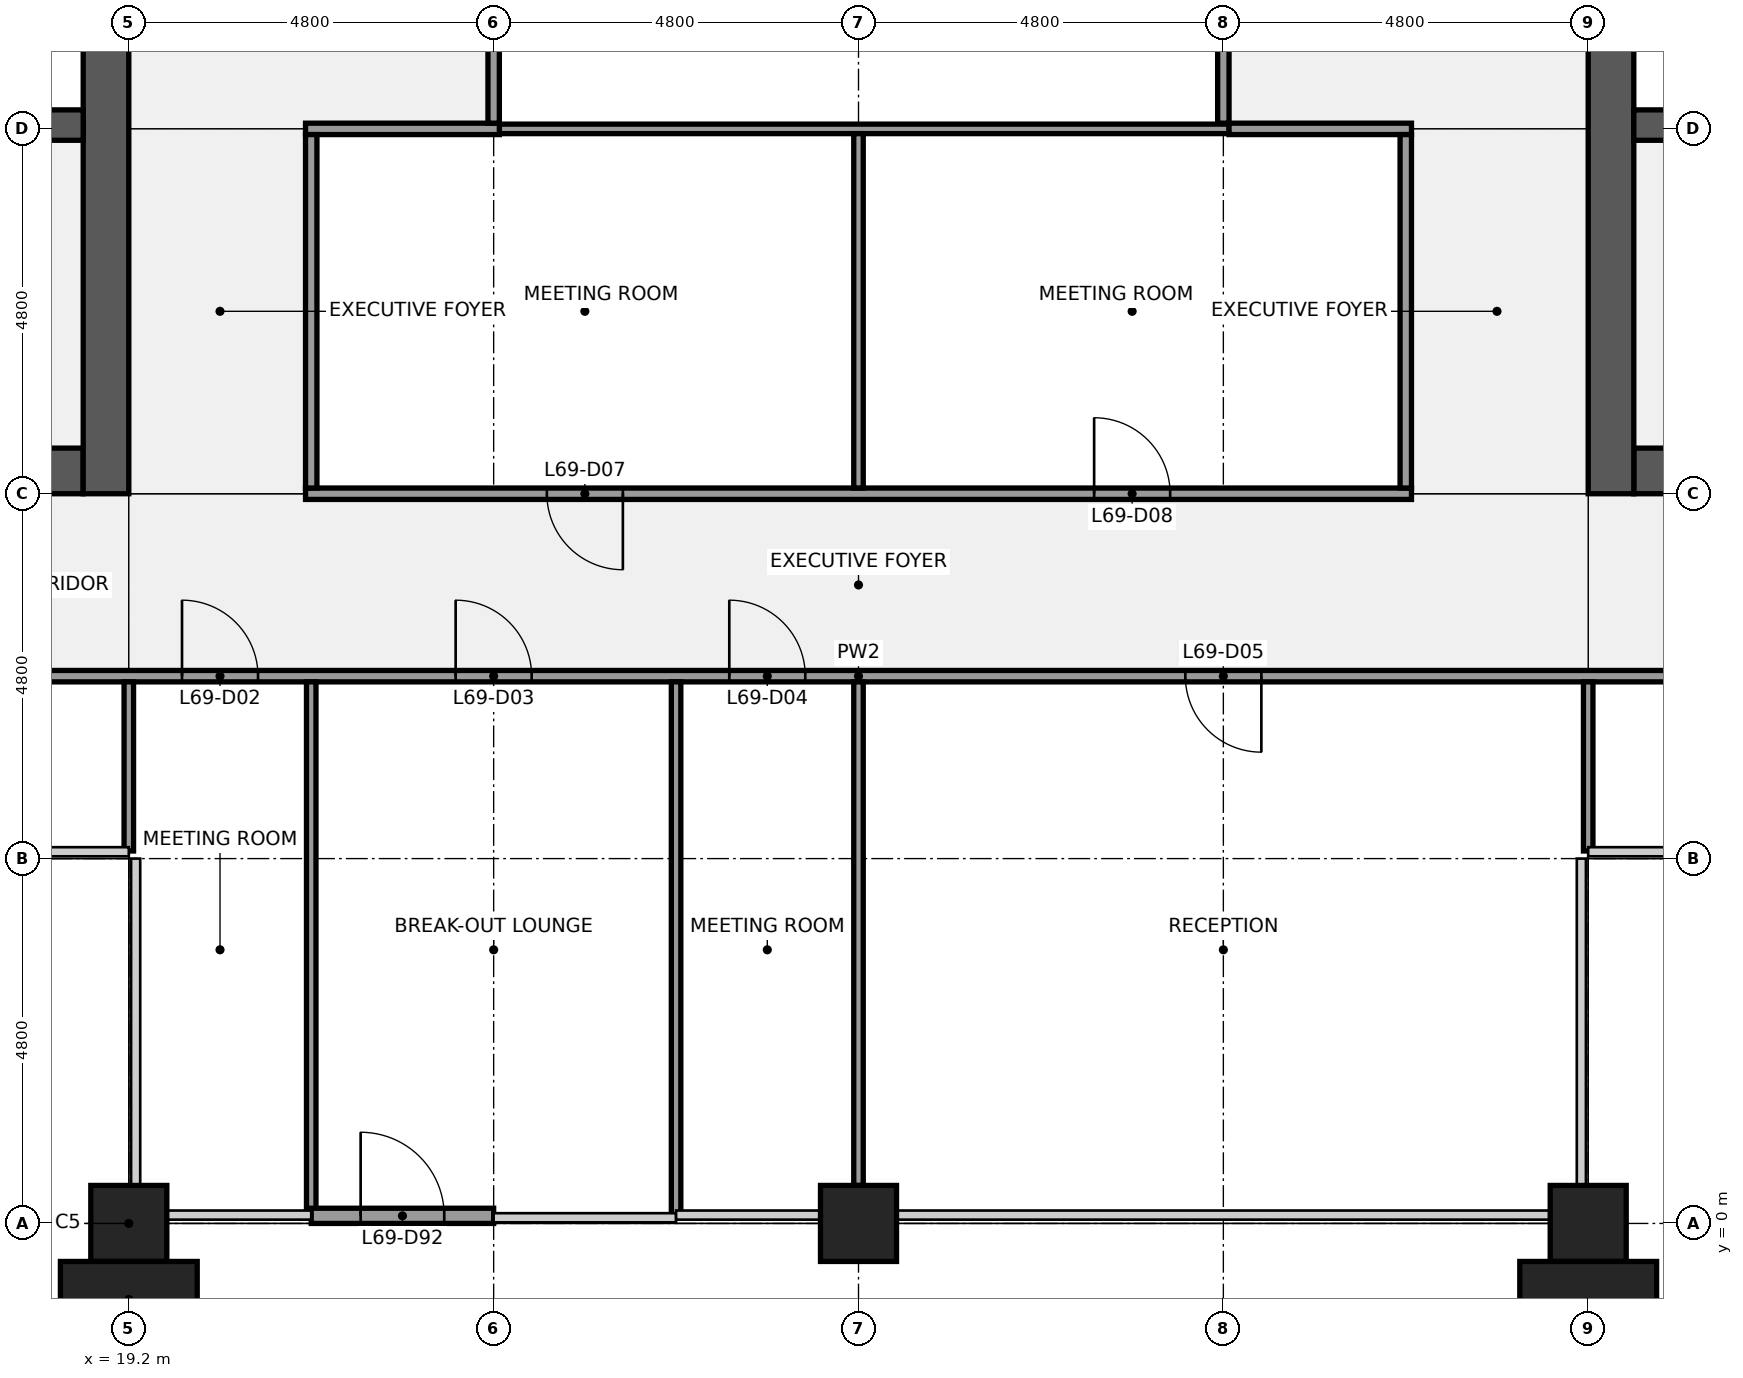
"""IFC4 building model, lengths in metres.
Left out: names, types, materials, properties, quantities, classifications, styles, units other than length and angle.
Written with IfcOpenShell. Run it as: python <this file> out.ifc"""

import sys

from ifc_helpers import new_model, si_unit, direction, frame, frame_2d, origin, origin_2d, place, context, subcontext, project, spatial, rectangle, extrude, element, fill, save


model = new_model("IFC4")
c1 = context("Model", 3, precision=1e-05, world=origin(), true_north=direction((0.0, 1.0)))
c2 = subcontext(c1, "Body", "Model", "MODEL_VIEW")
j1 = project(units=[si_unit("LENGTHUNIT", "METRE"), si_unit("PLANEANGLEUNIT", "RADIAN")], contexts=[c1])
p1 = place(None, origin())
s1 = spatial("IfcSite", under=j1, at=p1, CompositionType="ELEMENT")
p2 = place(p1, origin())
s2 = spatial("IfcBuilding", under=s1, at=p2, CompositionType="ELEMENT")
p3 = place(p2, frame((0.0, 0.0, 314.3)))
s3 = spatial("IfcBuildingStorey", under=s2, at=p3, CompositionType="ELEMENT", Elevation=314.3)
for number, where, z_axis, x_axis in (
    (1, (19.2, 0.0, 0.0), (0.0, 0.0, 1.0), (1.0, 0.0, 0.0)),
    (2, (28.8, 0.0, 0.0), (0.0, 0.0, 1.0), (1.0, 0.0, 0.0)),
    (3, (38.4, 0.0, 0.0), (0.0, 0.0, 1.0), (1.0, 0.0, 0.0)),
):
    element("IfcColumn", number, at=place(p3, frame(where, z_axis=z_axis, x_axis=x_axis)), inside=s3, PredefinedType="COLUMN", context=c2, shape_type="SweptSolid", body=[
        extrude(rectangle(XDim=1.0, YDim=1.0, at=origin_2d()), origin(), (0.0, 0.0, 1.0), 4.0),
    ])
p4 = place(p3, frame((18.6, 9.9, 0.0), z_axis=(0.0, 0.0, 1.0), x_axis=(-1.0, 0.0, 0.0)))
e4 = element("IfcWall", 4, at=p4, inside=s3, PredefinedType="SHEAR", context=c2, shape_type="SweptSolid", body=[
    extrude(rectangle(XDim=4.2, YDim=0.6, at=frame_2d((2.1, 0.0))), origin(), (0.0, 0.0, 1.0), 3.84),
])
p5 = place(p4, frame((1.25, 0.0, 0.0)))
e5 = element("IfcOpeningElement", 5, at=p5, cuts=e4, PredefinedType="OPENING", context=c2, shape_type="SweptSolid", body=[
    extrude(rectangle(XDim=1.1, YDim=2.1, at=frame_2d((0.55, 1.05))), frame((0.0, 0.31, 0.0), z_axis=(0.0, -1.0, 0.0), x_axis=(1.0, 0.0, 0.0)), (0.0, 0.0, 1.0), 0.62),
])
p6 = place(p3, frame((18.9, 38.4, 0.0), z_axis=(0.0, 0.0, 1.0), x_axis=(0.0, -1.0, 0.0)))
e6 = element("IfcWall", 6, at=p6, inside=s3, PredefinedType="SHEAR", context=c2, shape_type="SweptSolid", body=[
    extrude(rectangle(XDim=28.8, YDim=0.6, at=frame_2d((14.4, 0.0))), origin(), (0.0, 0.0, 1.0), 3.84),
])
p7 = place(p6, frame((18.3, 0.0, 0.0)))
e7 = element("IfcOpeningElement", 7, at=p7, cuts=e6, PredefinedType="OPENING", context=c2, shape_type="SweptSolid", body=[
    extrude(rectangle(XDim=1.8, YDim=2.1, at=frame_2d((0.9, 1.05))), frame((0.0, 0.31, 0.0), z_axis=(0.0, -1.0, 0.0), x_axis=(1.0, 0.0, 0.0)), (0.0, 0.0, 1.0), 0.62),
])
p8 = place(p6, frame((8.7, 0.0, 0.0)))
e8 = element("IfcOpeningElement", 8, at=p8, cuts=e6, PredefinedType="OPENING", context=c2, shape_type="SweptSolid", body=[
    extrude(rectangle(XDim=1.8, YDim=2.1, at=frame_2d((0.9, 1.05))), frame((0.0, 0.31, 0.0), z_axis=(0.0, -1.0, 0.0), x_axis=(1.0, 0.0, 0.0)), (0.0, 0.0, 1.0), 0.62),
])
p9 = place(p3, frame((0.6, 14.45, 0.0), z_axis=(0.0, 0.0, 1.0), x_axis=(1.0, 0.0, 0.0)))
e9 = element("IfcWall", 9, at=p9, inside=s3, PredefinedType="SHEAR", context=c2, shape_type="SweptSolid", body=[
    extrude(rectangle(XDim=18.0, YDim=0.4, at=frame_2d((9.0, 0.0))), origin(), (0.0, 0.0, 1.0), 3.84),
])
p10 = place(p3, frame((43.2, 9.9, 0.0), z_axis=(0.0, 0.0, 1.0), x_axis=(-1.0, 0.0, 0.0)))
e10 = element("IfcWall", 10, at=p10, inside=s3, PredefinedType="SHEAR", context=c2, shape_type="SweptSolid", body=[
    extrude(rectangle(XDim=4.2, YDim=0.6, at=frame_2d((2.1, 0.0))), origin(), (0.0, 0.0, 1.0), 3.84),
])
p11 = place(p10, frame((1.85, 0.0, 0.0)))
e11 = element("IfcOpeningElement", 11, at=p11, cuts=e10, PredefinedType="OPENING", context=c2, shape_type="SweptSolid", body=[
    extrude(rectangle(XDim=1.1, YDim=2.1, at=frame_2d((0.55, 1.05))), frame((0.0, 0.31, 0.0), z_axis=(0.0, -1.0, 0.0), x_axis=(1.0, 0.0, 0.0)), (0.0, 0.0, 1.0), 0.62),
])
p12 = place(p3, frame((38.7, 9.6, 0.0), z_axis=(0.0, 0.0, 1.0), x_axis=(0.0, 1.0, 0.0)))
e12 = element("IfcWall", 12, at=p12, inside=s3, PredefinedType="SHEAR", context=c2, shape_type="SweptSolid", body=[
    extrude(rectangle(XDim=28.8, YDim=0.6, at=frame_2d((14.4, 0.0))), origin(), (0.0, 0.0, 1.0), 3.84),
])
p13 = place(p12, frame((8.7, 0.0, 0.0)))
e13 = element("IfcOpeningElement", 13, at=p13, cuts=e12, PredefinedType="OPENING", context=c2, shape_type="SweptSolid", body=[
    extrude(rectangle(XDim=1.8, YDim=2.1, at=frame_2d((0.9, 1.05))), frame((0.0, 0.31, 0.0), z_axis=(0.0, -1.0, 0.0), x_axis=(1.0, 0.0, 0.0)), (0.0, 0.0, 1.0), 0.62),
])
p14 = place(p12, frame((18.3, 0.0, 0.0)))
e14 = element("IfcOpeningElement", 14, at=p14, cuts=e12, PredefinedType="OPENING", context=c2, shape_type="SweptSolid", body=[
    extrude(rectangle(XDim=1.8, YDim=2.1, at=frame_2d((0.9, 1.05))), frame((0.0, 0.31, 0.0), z_axis=(0.0, -1.0, 0.0), x_axis=(1.0, 0.0, 0.0)), (0.0, 0.0, 1.0), 0.62),
])
p15 = place(p3, frame((39.0, 14.45, 0.0), z_axis=(0.0, 0.0, 1.0), x_axis=(1.0, 0.0, 0.0)))
e15 = element("IfcWall", 15, at=p15, inside=s3, PredefinedType="SHEAR", context=c2, shape_type="SweptSolid", body=[
    extrude(rectangle(XDim=18.0, YDim=0.4, at=frame_2d((9.0, 0.0))), origin(), (0.0, 0.0, 1.0), 3.84),
])
p16 = place(p3, frame((14.5, 7.2, 0.0), z_axis=(0.0, 0.0, 1.0), x_axis=(1.0, 0.0, 0.0)))
e16 = element("IfcWall", 16, at=p16, inside=s3, PredefinedType="PARTITIONING", context=c2, shape_type="SweptSolid", body=[
    extrude(rectangle(XDim=28.6, YDim=0.15, at=frame_2d((14.3, 0.0))), origin(), (0.0, 0.0, 1.0), 2.87),
])
p17 = place(p16, frame((1.85, 0.0, 0.0)))
e17 = element("IfcOpeningElement", 17, at=p17, cuts=e16, PredefinedType="OPENING", context=c2, shape_type="SweptSolid", body=[
    extrude(rectangle(XDim=1.0, YDim=2.1, at=frame_2d((0.5, 1.05))), frame((0.0, 0.085, 0.0), z_axis=(0.0, -1.0, 0.0), x_axis=(1.0, 0.0, 0.0)), (0.0, 0.0, 1.0), 0.17),
])
p18 = place(p16, frame((5.4, 0.0, 0.0)))
e18 = element("IfcOpeningElement", 18, at=p18, cuts=e16, PredefinedType="OPENING", context=c2, shape_type="SweptSolid", body=[
    extrude(rectangle(XDim=1.0, YDim=2.1, at=frame_2d((0.5, 1.05))), frame((0.0, 0.085, 0.0), z_axis=(0.0, -1.0, 0.0), x_axis=(1.0, 0.0, 0.0)), (0.0, 0.0, 1.0), 0.17),
])
p19 = place(p16, frame((9.0, 0.0, 0.0)))
e19 = element("IfcOpeningElement", 19, at=p19, cuts=e16, PredefinedType="OPENING", context=c2, shape_type="SweptSolid", body=[
    extrude(rectangle(XDim=1.0, YDim=2.1, at=frame_2d((0.5, 1.05))), frame((0.0, 0.085, 0.0), z_axis=(0.0, -1.0, 0.0), x_axis=(1.0, 0.0, 0.0)), (0.0, 0.0, 1.0), 0.17),
])
p20 = place(p16, frame((12.6, 0.0, 0.0)))
e20 = element("IfcOpeningElement", 20, at=p20, cuts=e16, PredefinedType="OPENING", context=c2, shape_type="SweptSolid", body=[
    extrude(rectangle(XDim=1.0, YDim=2.1, at=frame_2d((0.5, 1.05))), frame((0.0, 0.085, 0.0), z_axis=(0.0, -1.0, 0.0), x_axis=(1.0, 0.0, 0.0)), (0.0, 0.0, 1.0), 0.17),
])
p21 = place(p16, frame((18.6, 0.0, 0.0)))
e21 = element("IfcOpeningElement", 21, at=p21, cuts=e16, PredefinedType="OPENING", context=c2, shape_type="SweptSolid", body=[
    extrude(rectangle(XDim=1.0, YDim=2.1, at=frame_2d((0.5, 1.05))), frame((0.0, 0.085, 0.0), z_axis=(0.0, -1.0, 0.0), x_axis=(1.0, 0.0, 0.0)), (0.0, 0.0, 1.0), 0.17),
])
p22 = place(p16, frame((25.75, 0.0, 0.0)))
e22 = element("IfcOpeningElement", 22, at=p22, cuts=e16, PredefinedType="OPENING", context=c2, shape_type="SweptSolid", body=[
    extrude(rectangle(XDim=1.0, YDim=2.1, at=frame_2d((0.5, 1.05))), frame((0.0, 0.085, 0.0), z_axis=(0.0, -1.0, 0.0), x_axis=(1.0, 0.0, 0.0)), (0.0, 0.0, 1.0), 0.17),
])
p23 = place(p3, frame((21.525, 9.6, 0.0), z_axis=(0.0, 0.0, 1.0), x_axis=(1.0, 0.0, 0.0)))
e23 = element("IfcWall", 23, at=p23, inside=s3, PredefinedType="PARTITIONING", context=c2, shape_type="SweptSolid", body=[
    extrude(rectangle(XDim=14.55, YDim=0.15, at=frame_2d((7.275, 0.0))), origin(), (0.0, 0.0, 1.0), 2.87),
])
p24 = place(p23, frame((3.175, 0.0, 0.0)))
e24 = element("IfcOpeningElement", 24, at=p24, cuts=e23, PredefinedType="OPENING", context=c2, shape_type="SweptSolid", body=[
    extrude(rectangle(XDim=1.0, YDim=2.1, at=frame_2d((0.5, 1.05))), frame((0.0, 0.085, 0.0), z_axis=(0.0, -1.0, 0.0), x_axis=(1.0, 0.0, 0.0)), (0.0, 0.0, 1.0), 0.17),
])
p25 = place(p23, frame((10.375, 0.0, 0.0)))
e25 = element("IfcOpeningElement", 25, at=p25, cuts=e23, PredefinedType="OPENING", context=c2, shape_type="SweptSolid", body=[
    extrude(rectangle(XDim=1.0, YDim=2.1, at=frame_2d((0.5, 1.05))), frame((0.0, 0.085, 0.0), z_axis=(0.0, -1.0, 0.0), x_axis=(1.0, 0.0, 0.0)), (0.0, 0.0, 1.0), 0.17),
])
p26 = place(p3, frame((24.075, 14.4, 0.0), z_axis=(0.0, 0.0, 1.0), x_axis=(1.0, 0.0, 0.0)))
e26 = element("IfcWall", 26, at=p26, inside=s3, PredefinedType="PARTITIONING", context=c2, shape_type="SweptSolid", body=[
    extrude(rectangle(XDim=9.6, YDim=0.125, at=frame_2d((4.8, 0.0))), origin(), (0.0, 0.0, 1.0), 2.87),
])
p27 = place(p3, frame((21.525, 14.4, 0.0), z_axis=(0.0, 0.0, 1.0), x_axis=(1.0, 0.0, 0.0)))
e27 = element("IfcWall", 27, at=p27, inside=s3, PredefinedType="PARTITIONING", context=c2, shape_type="SweptSolid", body=[
    extrude(rectangle(XDim=2.55, YDim=0.15, at=frame_2d((1.275, 0.0))), origin(), (0.0, 0.0, 1.0), 2.87),
])
p28 = place(p3, frame((33.675, 14.4, 0.0), z_axis=(0.0, 0.0, 1.0), x_axis=(1.0, 0.0, 0.0)))
e28 = element("IfcWall", 28, at=p28, inside=s3, PredefinedType="PARTITIONING", context=c2, shape_type="SweptSolid", body=[
    extrude(rectangle(XDim=2.4, YDim=0.15, at=frame_2d((1.2, 0.0))), origin(), (0.0, 0.0, 1.0), 2.87),
])
p29 = place(p3, frame((19.2, 4.9, 0.0), z_axis=(0.0, 0.0, 1.0), x_axis=(0.0, 1.0, 0.0)))
e29 = element("IfcWall", 29, at=p29, inside=s3, PredefinedType="PARTITIONING", context=c2, shape_type="SweptSolid", body=[
    extrude(rectangle(XDim=2.225, YDim=0.125, at=frame_2d((1.113, 0.0))), origin(), (0.0, 0.0, 1.0), 2.87),
])
p30 = place(p3, frame((21.6, 0.1, 0.0), z_axis=(0.0, 0.0, 1.0), x_axis=(0.0, 1.0, 0.0)))
e30 = element("IfcWall", 30, at=p30, inside=s3, PredefinedType="PARTITIONING", context=c2, shape_type="SweptSolid", body=[
    extrude(rectangle(XDim=7.025, YDim=0.125, at=frame_2d((3.512, 0.0))), origin(), (0.0, 0.0, 1.0), 2.87),
])
p31 = place(p3, frame((21.6, 9.675, 0.0), z_axis=(0.0, 0.0, 1.0), x_axis=(0.0, 1.0, 0.0)))
e31 = element("IfcWall", 31, at=p31, inside=s3, PredefinedType="PARTITIONING", context=c2, shape_type="SweptSolid", body=[
    extrude(rectangle(XDim=4.65, YDim=0.15, at=frame_2d((2.325, 0.0))), origin(), (0.0, 0.0, 1.0), 2.87),
])
p32 = place(p3, frame((24.0, 14.475, 0.0), z_axis=(0.0, 0.0, 1.0), x_axis=(0.0, 1.0, 0.0)))
e32 = element("IfcWall", 32, at=p32, inside=s3, PredefinedType="PARTITIONING", context=c2, shape_type="SweptSolid", body=[
    extrude(rectangle(XDim=5.85, YDim=0.15, at=frame_2d((2.925, 0.0))), origin(), (0.0, 0.0, 1.0), 2.87),
])
p33 = place(p3, frame((26.4, 0.1, 0.0), z_axis=(0.0, 0.0, 1.0), x_axis=(0.0, 1.0, 0.0)))
e33 = element("IfcWall", 33, at=p33, inside=s3, PredefinedType="PARTITIONING", context=c2, shape_type="SweptSolid", body=[
    extrude(rectangle(XDim=7.025, YDim=0.125, at=frame_2d((3.512, 0.0))), origin(), (0.0, 0.0, 1.0), 2.87),
])
p34 = place(p3, frame((28.8, 0.5, 0.0), z_axis=(0.0, 0.0, 1.0), x_axis=(0.0, 1.0, 0.0)))
e34 = element("IfcWall", 34, at=p34, inside=s3, PredefinedType="PARTITIONING", context=c2, shape_type="SweptSolid", body=[
    extrude(rectangle(XDim=6.625, YDim=0.125, at=frame_2d((3.312, 0.0))), origin(), (0.0, 0.0, 1.0), 2.87),
])
p35 = place(p3, frame((28.8, 9.675, 0.0), z_axis=(0.0, 0.0, 1.0), x_axis=(0.0, 1.0, 0.0)))
e35 = element("IfcWall", 35, at=p35, inside=s3, PredefinedType="PARTITIONING", context=c2, shape_type="SweptSolid", body=[
    extrude(rectangle(XDim=4.662, YDim=0.125, at=frame_2d((2.331, 0.0))), origin(), (0.0, 0.0, 1.0), 2.87),
])
p36 = place(p3, frame((33.6, 14.475, 0.0), z_axis=(0.0, 0.0, 1.0), x_axis=(0.0, 1.0, 0.0)))
e36 = element("IfcWall", 36, at=p36, inside=s3, PredefinedType="PARTITIONING", context=c2, shape_type="SweptSolid", body=[
    extrude(rectangle(XDim=5.85, YDim=0.15, at=frame_2d((2.925, 0.0))), origin(), (0.0, 0.0, 1.0), 2.87),
])
p37 = place(p3, frame((36.0, 9.675, 0.0), z_axis=(0.0, 0.0, 1.0), x_axis=(0.0, 1.0, 0.0)))
e37 = element("IfcWall", 37, at=p37, inside=s3, PredefinedType="PARTITIONING", context=c2, shape_type="SweptSolid", body=[
    extrude(rectangle(XDim=4.65, YDim=0.15, at=frame_2d((2.325, 0.0))), origin(), (0.0, 0.0, 1.0), 2.87),
])
p38 = place(p3, frame((38.4, 4.9, 0.0), z_axis=(0.0, 0.0, 1.0), x_axis=(0.0, 1.0, 0.0)))
e38 = element("IfcWall", 38, at=p38, inside=s3, PredefinedType="PARTITIONING", context=c2, shape_type="SweptSolid", body=[
    extrude(rectangle(XDim=2.225, YDim=0.125, at=frame_2d((1.113, 0.0))), origin(), (0.0, 0.0, 1.0), 2.87),
])
p39 = place(p3, frame((21.6, 0.1, 0.0), z_axis=(0.0, 0.0, 1.0), x_axis=(1.0, 0.0, 0.0)))
e39 = element("IfcWall", 39, at=p39, inside=s3, PredefinedType="SOLIDWALL", context=c2, shape_type="SweptSolid", body=[
    extrude(rectangle(XDim=2.4, YDim=0.2, at=frame_2d((1.2, 0.0))), origin(), (0.0, 0.0, 1.0), 3.314),
])
p40 = place(p39, frame((0.65, 0.0, 0.0)))
e40 = element("IfcOpeningElement", 40, at=p40, cuts=e39, PredefinedType="OPENING", context=c2, shape_type="SweptSolid", body=[
    extrude(rectangle(XDim=1.1, YDim=2.1, at=frame_2d((0.55, 1.05))), frame((0.0, 0.11, 0.0), z_axis=(0.0, -1.0, 0.0), x_axis=(1.0, 0.0, 0.0)), (0.0, 0.0, 1.0), 0.22),
])
for number, where, z_axis, x_axis in (
    (41, (19.2, -1.0, 0.0), (0.0, 0.0, 1.0), (1.0, 0.0, 0.0)),
    (42, (38.4, -1.0, 0.0), (0.0, 0.0, 1.0), (1.0, 0.0, 0.0)),
):
    element("IfcColumn", number, at=place(p3, frame(where, z_axis=z_axis, x_axis=x_axis)), inside=s3, PredefinedType="PILASTER", context=c2, shape_type="SweptSolid", body=[
        extrude(rectangle(XDim=1.8, YDim=1.0, at=origin_2d()), origin(), (0.0, 0.0, 1.0), 4.0),
    ])
p41 = place(p18, origin())
e43 = element("IfcDoor", 43, at=p41, inside=s3, OperationType="SINGLE_SWING_LEFT", PredefinedType="DOOR", context=c2, shape_type="SweptSolid", body=[
    extrude(rectangle(XDim=1.0, YDim=2.1, at=frame_2d((0.5, 1.05))), frame((0.0, 0.025, 0.0), z_axis=(0.0, -1.0, 0.0), x_axis=(1.0, 0.0, 0.0)), (0.0, 0.0, 1.0), 0.05),
])
fill(e18, e43)
p42 = place(p19, origin())
e44 = element("IfcDoor", 44, at=p42, inside=s3, OperationType="SINGLE_SWING_LEFT", PredefinedType="DOOR", context=c2, shape_type="SweptSolid", body=[
    extrude(rectangle(XDim=1.0, YDim=2.1, at=frame_2d((0.5, 1.05))), frame((0.0, 0.025, 0.0), z_axis=(0.0, -1.0, 0.0), x_axis=(1.0, 0.0, 0.0)), (0.0, 0.0, 1.0), 0.05),
])
fill(e19, e44)
p43 = place(p20, origin())
e45 = element("IfcDoor", 45, at=p43, inside=s3, OperationType="SINGLE_SWING_LEFT", PredefinedType="DOOR", context=c2, shape_type="SweptSolid", body=[
    extrude(rectangle(XDim=1.0, YDim=2.1, at=frame_2d((0.5, 1.05))), frame((0.0, 0.025, 0.0), z_axis=(0.0, -1.0, 0.0), x_axis=(1.0, 0.0, 0.0)), (0.0, 0.0, 1.0), 0.05),
])
fill(e20, e45)
p44 = place(p21, origin())
e46 = element("IfcDoor", 46, at=p44, inside=s3, OperationType="SINGLE_SWING_RIGHT", PredefinedType="DOOR", context=c2, shape_type="SweptSolid", body=[
    extrude(rectangle(XDim=1.0, YDim=2.1, at=frame_2d((0.5, 1.05))), frame((0.0, 0.025, 0.0), z_axis=(0.0, -1.0, 0.0), x_axis=(1.0, 0.0, 0.0)), (0.0, 0.0, 1.0), 0.05),
])
fill(e21, e46)
p45 = place(p24, origin())
e47 = element("IfcDoor", 47, at=p45, inside=s3, OperationType="SINGLE_SWING_RIGHT", PredefinedType="DOOR", context=c2, shape_type="SweptSolid", body=[
    extrude(rectangle(XDim=1.0, YDim=2.1, at=frame_2d((0.5, 1.05))), frame((0.0, 0.025, 0.0), z_axis=(0.0, -1.0, 0.0), x_axis=(1.0, 0.0, 0.0)), (0.0, 0.0, 1.0), 0.05),
])
fill(e24, e47)
p46 = place(p25, origin())
e48 = element("IfcDoor", 48, at=p46, inside=s3, OperationType="SINGLE_SWING_LEFT", PredefinedType="DOOR", context=c2, shape_type="SweptSolid", body=[
    extrude(rectangle(XDim=1.0, YDim=2.1, at=frame_2d((0.5, 1.05))), frame((0.0, 0.025, 0.0), z_axis=(0.0, -1.0, 0.0), x_axis=(1.0, 0.0, 0.0)), (0.0, 0.0, 1.0), 0.05),
])
fill(e25, e48)
p47 = place(p40, origin())
e49 = element("IfcDoor", 49, at=p47, inside=s3, OperationType="SINGLE_SWING_LEFT", PredefinedType="DOOR", context=c2, shape_type="SweptSolid", body=[
    extrude(rectangle(XDim=1.1, YDim=2.1, at=frame_2d((0.55, 1.05))), frame((0.0, 0.025, 0.0), z_axis=(0.0, -1.0, 0.0), x_axis=(1.0, 0.0, 0.0)), (0.0, 0.0, 1.0), 0.05),
])
fill(e40, e49)
save(model, sys.argv[1])
